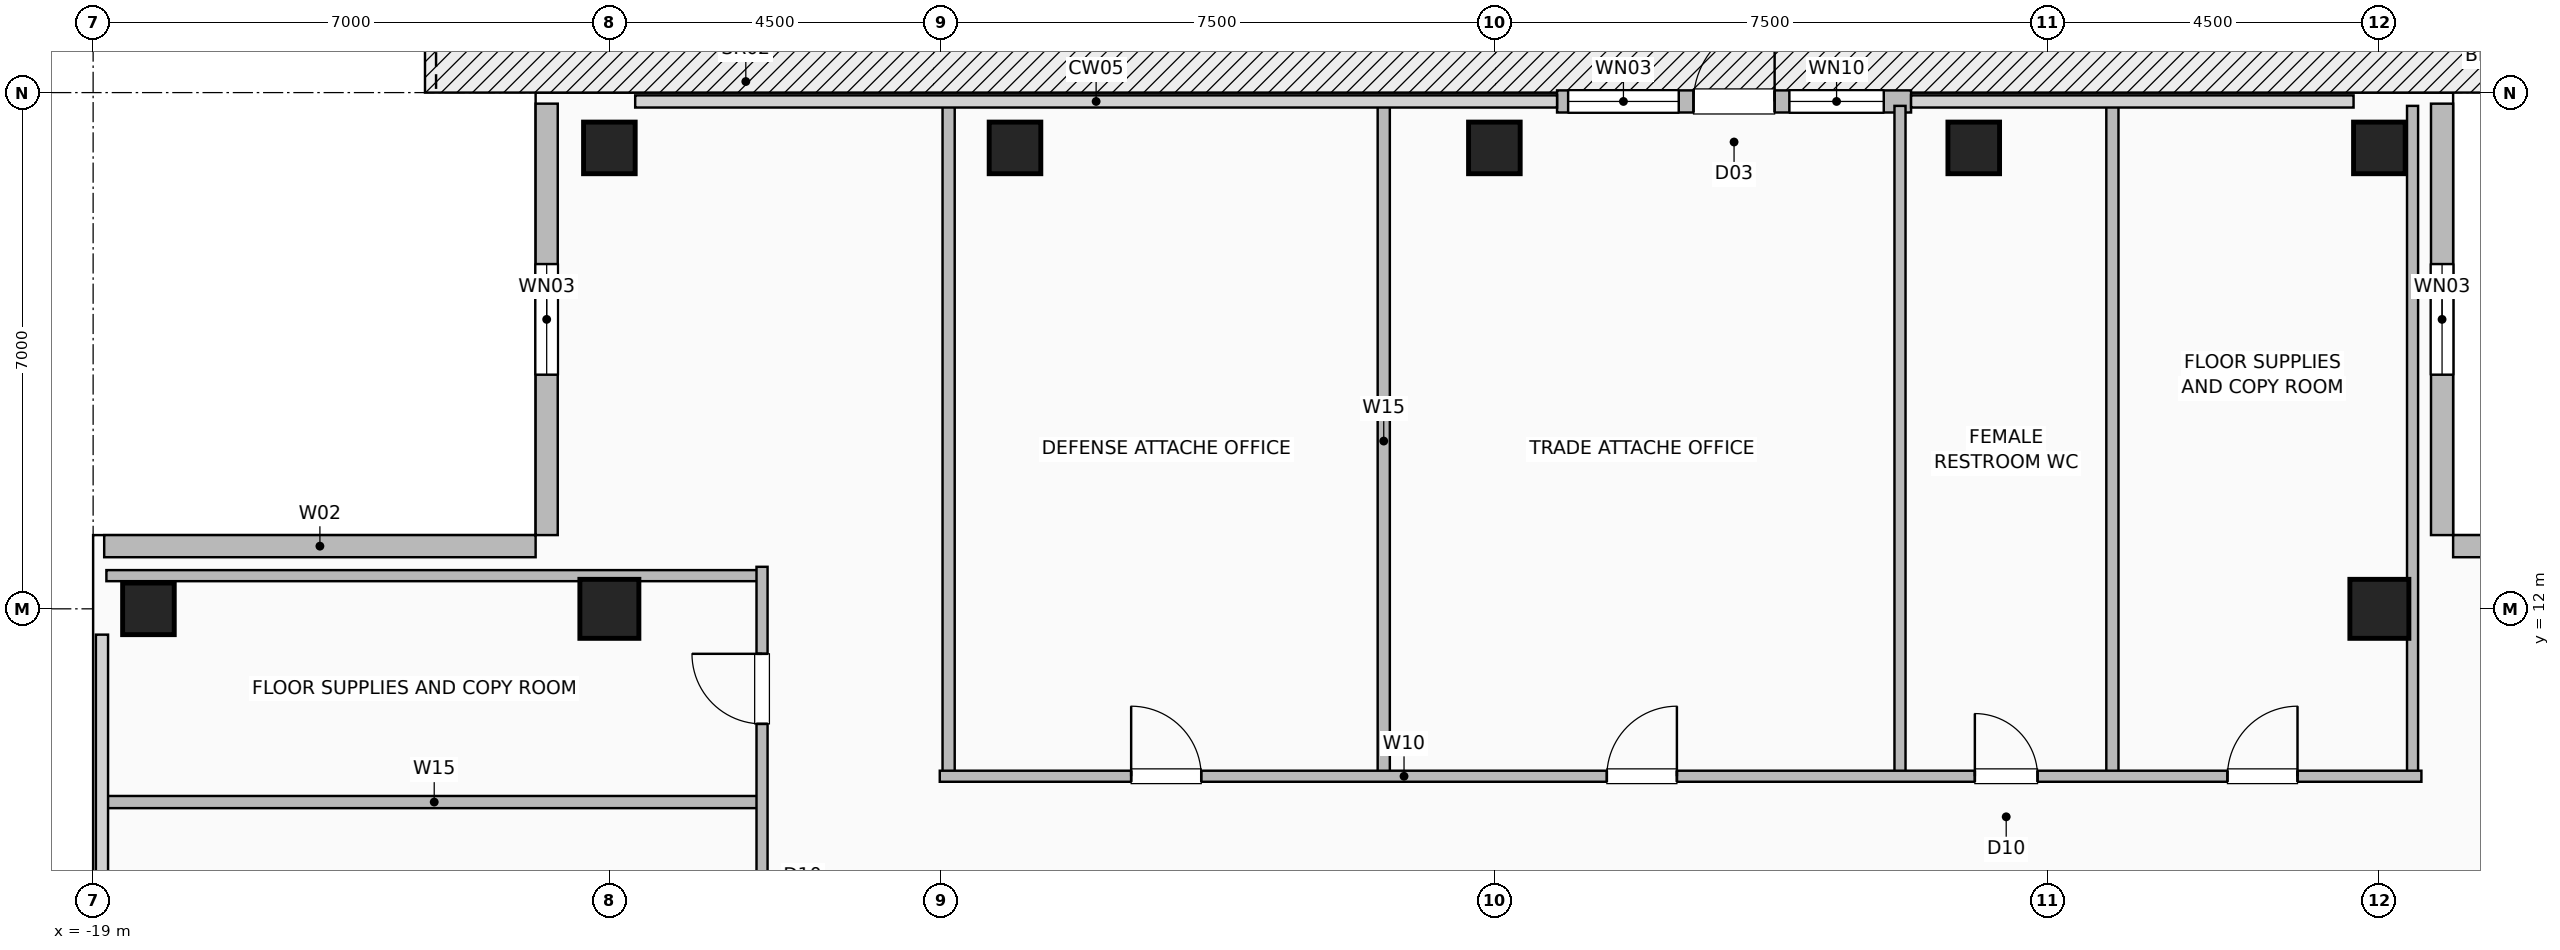
"""IFC4 building model, lengths in metres.
Left out: names, types, materials, properties, quantities, classifications, styles, units other than length and angle.
Written with IfcOpenShell. Run it as: python <this file> out.ifc"""

import sys

from ifc_helpers import new_model, si_unit, direction, frame, frame_2d, origin, origin_2d, place, context, subcontext, project, spatial, rectangle, hollow_rectangle, extrude, element, fill, save


model = new_model("IFC4")
c1 = context("Model", 3, precision=1e-05, world=origin(), true_north=direction((0.0, 1.0)))
c2 = subcontext(c1, "Body", "Model", "MODEL_VIEW")
j1 = project(units=[si_unit("LENGTHUNIT", "METRE"), si_unit("PLANEANGLEUNIT", "RADIAN")], contexts=[c1])
p1 = place(None, origin())
s1 = spatial("IfcSite", under=j1, at=p1, CompositionType="ELEMENT")
p2 = place(p1, origin())
s2 = spatial("IfcBuilding", under=s1, at=p2, CompositionType="ELEMENT")
p3 = place(p2, frame((0.0, 0.0, 232.4)))
s3 = spatial("IfcBuildingStorey", under=s2, at=p3, CompositionType="ELEMENT", Elevation=232.4)
for number, where, z_axis, x_axis in (
    (1, (-12.0, 18.25, -0.4), (0.0, 0.0, 1.0), (1.0, 0.0, 0.0)),
    (2, (-6.5, 18.25, -0.4), (0.0, 0.0, 1.0), (1.0, 0.0, 0.0)),
    (3, (0.0, 18.25, -0.4), (0.0, 0.0, 1.0), (1.0, 0.0, 0.0)),
    (4, (6.5, 18.25, -0.4), (0.0, 0.0, 1.0), (1.0, 0.0, 0.0)),
    (5, (12.0, 18.25, -0.4), (0.0, 0.0, 1.0), (1.0, 0.0, 0.0)),
    (6, (-18.25, 12.0, -0.4), (0.0, 0.0, 1.0), (1.0, 0.0, 0.0)),
):
    element("IfcColumn", number, at=place(p3, frame(where, z_axis=z_axis, x_axis=x_axis)), inside=s3, PredefinedType="COLUMN", context=c2, shape_type="SweptSolid", body=[
        extrude(hollow_rectangle(XDim=0.7, YDim=0.7, WallThickness=0.035, at=origin_2d()), origin(), (0.0, 0.0, 1.0), 4.0),
    ])
for number, where, z_axis, x_axis in (
    (7, (12.0, 12.0, -0.4), (0.0, 0.0, 1.0), (1.0, 0.0, 0.0)),
    (8, (-12.0, 12.0, -0.4), (0.0, 0.0, 1.0), (1.0, 0.0, 0.0)),
):
    element("IfcColumn", number, at=place(p3, frame(where, z_axis=z_axis, x_axis=x_axis)), inside=s3, PredefinedType="COLUMN", context=c2, shape_type="SweptSolid", body=[
        extrude(hollow_rectangle(XDim=0.8, YDim=0.8, WallThickness=0.04, at=origin_2d()), origin(), (0.0, 0.0, 1.0), 4.0),
    ])
p4 = place(p3, frame((0.85, 18.88, 0.0), z_axis=(0.0, 0.0, 1.0), x_axis=(1.0, 0.0, 0.0)))
e9 = element("IfcWall", 9, at=p4, inside=s3, PredefinedType="SOLIDWALL", context=c2, shape_type="SweptSolid", body=[
    extrude(rectangle(XDim=4.8, YDim=0.3, at=frame_2d((2.4, 0.0))), origin(), (0.0, 0.0, 1.0), 3.36),
])
p5 = place(p4, frame((1.85, 0.0, 0.0)))
e10 = element("IfcOpeningElement", 10, at=p5, cuts=e9, PredefinedType="OPENING", context=c2, shape_type="SweptSolid", body=[
    extrude(rectangle(XDim=1.1, YDim=2.2, at=frame_2d((0.55, 1.1))), frame((0.0, 0.16, 0.0), z_axis=(0.0, -1.0, 0.0), x_axis=(1.0, 0.0, 0.0)), (0.0, 0.0, 1.0), 0.32),
])
p6 = place(p4, frame((0.15, 0.0, 0.85)))
e11 = element("IfcOpeningElement", 11, at=p6, cuts=e9, PredefinedType="OPENING", context=c2, shape_type="SweptSolid", body=[
    extrude(rectangle(XDim=1.5, YDim=1.8, at=frame_2d((0.75, 0.9))), frame((0.0, 0.16, 0.0), z_axis=(0.0, -1.0, 0.0), x_axis=(1.0, 0.0, 0.0)), (0.0, 0.0, 1.0), 0.32),
])
p7 = place(p4, frame((3.15, 0.0, 0.85)))
e12 = element("IfcOpeningElement", 12, at=p7, cuts=e9, PredefinedType="OPENING", context=c2, shape_type="SweptSolid", body=[
    extrude(rectangle(XDim=1.28, YDim=1.8, at=frame_2d((0.64, 0.9))), frame((0.0, 0.16, 0.0), z_axis=(0.0, -1.0, 0.0), x_axis=(1.0, 0.0, 0.0)), (0.0, 0.0, 1.0), 0.32),
])
p8 = place(p3, frame((12.85, 18.85, 0.0), z_axis=(0.0, 0.0, 1.0), x_axis=(0.0, -1.0, 0.0)))
e13 = element("IfcWall", 13, at=p8, inside=s3, PredefinedType="SOLIDWALL", context=c2, shape_type="SweptSolid", body=[
    extrude(rectangle(XDim=5.85, YDim=0.3, at=frame_2d((2.925, 0.0))), origin(), (0.0, 0.0, 1.0), 3.36),
])
p9 = place(p8, frame((2.175, 0.0, 0.9)))
e14 = element("IfcOpeningElement", 14, at=p9, cuts=e13, PredefinedType="OPENING", context=c2, shape_type="SweptSolid", body=[
    extrude(rectangle(XDim=1.5, YDim=1.8, at=frame_2d((0.75, 0.9))), frame((0.0, 0.16, 0.0), z_axis=(0.0, -1.0, 0.0), x_axis=(1.0, 0.0, 0.0)), (0.0, 0.0, 1.0), 0.32),
])
p10 = place(p3, frame((18.85, 12.85, 0.0), z_axis=(0.0, 0.0, 1.0), x_axis=(-1.0, 0.0, 0.0)))
e15 = element("IfcWall", 15, at=p10, inside=s3, PredefinedType="SOLIDWALL", context=c2, shape_type="SweptSolid", body=[
    extrude(rectangle(XDim=5.85, YDim=0.3, at=frame_2d((2.925, 0.0))), origin(), (0.0, 0.0, 1.0), 3.36),
])
p11 = place(p3, frame((-12.85, 18.85, 0.0), z_axis=(0.0, 0.0, 1.0), x_axis=(0.0, -1.0, 0.0)))
e16 = element("IfcWall", 16, at=p11, inside=s3, PredefinedType="SOLIDWALL", context=c2, shape_type="SweptSolid", body=[
    extrude(rectangle(XDim=5.85, YDim=0.3, at=frame_2d((2.925, 0.0))), origin(), (0.0, 0.0, 1.0), 3.36),
])
p12 = place(p11, frame((2.175, 0.0, 0.9)))
e17 = element("IfcOpeningElement", 17, at=p12, cuts=e16, PredefinedType="OPENING", context=c2, shape_type="SweptSolid", body=[
    extrude(rectangle(XDim=1.5, YDim=1.8, at=frame_2d((0.75, 0.9))), frame((0.0, 0.16, 0.0), z_axis=(0.0, -1.0, 0.0), x_axis=(1.0, 0.0, 0.0)), (0.0, 0.0, 1.0), 0.32),
])
p13 = place(p3, frame((-18.85, 12.85, 0.0), z_axis=(0.0, 0.0, 1.0), x_axis=(1.0, 0.0, 0.0)))
e18 = element("IfcWall", 18, at=p13, inside=s3, PredefinedType="SOLIDWALL", context=c2, shape_type="SweptSolid", body=[
    extrude(rectangle(XDim=5.85, YDim=0.3, at=frame_2d((2.925, 0.0))), origin(), (0.0, 0.0, 1.0), 3.36),
])
p14 = place(p3, frame((-18.82, 9.38, 0.0), z_axis=(0.0, 0.0, 1.0), x_axis=(1.0, 0.0, 0.0)))
e19 = element("IfcWall", 19, at=p14, inside=s3, PredefinedType="PLUMBINGWALL", context=c2, shape_type="SweptSolid", body=[
    extrude(rectangle(XDim=8.89, YDim=0.165, at=frame_2d((4.445, 0.0))), origin(), (0.0, 0.0, 1.0), 3.36),
])
p15 = place(p3, frame((-18.82, 12.45, 0.0), z_axis=(0.0, 0.0, 1.0), x_axis=(1.0, 0.0, 0.0)))
e20 = element("IfcWall", 20, at=p15, inside=s3, PredefinedType="PARTITIONING", context=c2, shape_type="SweptSolid", body=[
    extrude(rectangle(XDim=8.89, YDim=0.15, at=frame_2d((4.445, 0.0))), origin(), (0.0, 0.0, 1.0), 3.36),
])
p16 = place(p3, frame((-9.93, -7.52, 0.0), z_axis=(0.0, 0.0, 1.0), x_axis=(0.0, 1.0, 0.0)))
e21 = element("IfcWall", 21, at=p16, inside=s3, PredefinedType="PARTITIONING", context=c2, shape_type="SweptSolid", body=[
    extrude(rectangle(XDim=20.09, YDim=0.15, at=frame_2d((10.045, 0.0))), origin(), (0.0, 0.0, 1.0), 3.36),
])
p17 = place(p16, frame((1.945, 0.0, 0.0)))
e22 = element("IfcOpeningElement", 22, at=p17, cuts=e21, PredefinedType="OPENING", context=c2, shape_type="SweptSolid", body=[
    extrude(rectangle(XDim=0.95, YDim=2.06, at=frame_2d((0.475, 1.03))), frame((0.0, 0.085, 0.0), z_axis=(0.0, -1.0, 0.0), x_axis=(1.0, 0.0, 0.0)), (0.0, 0.0, 1.0), 0.17),
])
p18 = place(p16, frame((6.47, 0.0, 0.0)))
e23 = element("IfcOpeningElement", 23, at=p18, cuts=e21, PredefinedType="OPENING", context=c2, shape_type="SweptSolid", body=[
    extrude(rectangle(XDim=0.95, YDim=2.06, at=frame_2d((0.475, 1.03))), frame((0.0, 0.085, 0.0), z_axis=(0.0, -1.0, 0.0), x_axis=(1.0, 0.0, 0.0)), (0.0, 0.0, 1.0), 0.17),
])
p19 = place(p16, frame((11.12, 0.0, 0.0)))
e24 = element("IfcOpeningElement", 24, at=p19, cuts=e21, PredefinedType="OPENING", context=c2, shape_type="SweptSolid", body=[
    extrude(rectangle(XDim=0.95, YDim=2.06, at=frame_2d((0.475, 1.03))), frame((0.0, 0.085, 0.0), z_axis=(0.0, -1.0, 0.0), x_axis=(1.0, 0.0, 0.0)), (0.0, 0.0, 1.0), 0.17),
])
p20 = place(p16, frame((15.035, 0.0, 0.0)))
e25 = element("IfcOpeningElement", 25, at=p20, cuts=e21, PredefinedType="OPENING", context=c2, shape_type="SweptSolid", body=[
    extrude(rectangle(XDim=0.85, YDim=2.05, at=frame_2d((0.425, 1.025))), frame((0.0, 0.085, 0.0), z_axis=(0.0, -1.0, 0.0), x_axis=(1.0, 0.0, 0.0)), (0.0, 0.0, 1.0), 0.17),
])
p21 = place(p16, frame((17.96, 0.0, 0.0)))
e26 = element("IfcOpeningElement", 26, at=p21, cuts=e21, PredefinedType="OPENING", context=c2, shape_type="SweptSolid", body=[
    extrude(rectangle(XDim=0.95, YDim=2.06, at=frame_2d((0.475, 1.03))), frame((0.0, 0.085, 0.0), z_axis=(0.0, -1.0, 0.0), x_axis=(1.0, 0.0, 0.0)), (0.0, 0.0, 1.0), 0.17),
])
for number, where, z_axis, x_axis in (
    (27, (8.38, 9.73, 0.0), (0.0, 0.0, 1.0), (0.0, 1.0, 0.0)),
    (28, (-7.4, 9.73, 0.0), (0.0, 0.0, 1.0), (0.0, 1.0, 0.0)),
    (29, (-1.5, 9.73, 0.0), (0.0, 0.0, 1.0), (0.0, 1.0, 0.0)),
):
    element("IfcWall", number, at=place(p3, frame(where, z_axis=z_axis, x_axis=x_axis)), inside=s3, PredefinedType="PLUMBINGWALL", context=c2, shape_type="SweptSolid", body=[
        extrude(rectangle(XDim=9.09, YDim=0.165, at=frame_2d((4.545, 0.0))), origin(), (0.0, 0.0, 1.0), 3.36),
    ])
for number, where, z_axis, x_axis in (
    (30, (5.5, 9.73, 0.0), (0.0, 0.0, 1.0), (0.0, 1.0, 0.0)),
    (31, (12.45, 9.73, 0.0), (0.0, 0.0, 1.0), (0.0, 1.0, 0.0)),
):
    element("IfcWall", number, at=place(p3, frame(where, z_axis=z_axis, x_axis=x_axis)), inside=s3, PredefinedType="PARTITIONING", context=c2, shape_type="SweptSolid", body=[
        extrude(rectangle(XDim=9.09, YDim=0.15, at=frame_2d((4.545, 0.0))), origin(), (0.0, 0.0, 1.0), 3.36),
    ])
p22 = place(p3, frame((-7.52, 9.73, 0.0), z_axis=(0.0, 0.0, 1.0), x_axis=(1.0, 0.0, 0.0)))
e32 = element("IfcWall", 32, at=p22, inside=s3, PredefinedType="PARTITIONING", context=c2, shape_type="SweptSolid", body=[
    extrude(rectangle(XDim=20.09, YDim=0.15, at=frame_2d((10.045, 0.0))), origin(), (0.0, 0.0, 1.0), 3.36),
])
p23 = place(p22, frame((2.595, 0.0, 0.0)))
e33 = element("IfcOpeningElement", 33, at=p23, cuts=e32, PredefinedType="OPENING", context=c2, shape_type="SweptSolid", body=[
    extrude(rectangle(XDim=0.95, YDim=2.06, at=frame_2d((0.475, 1.03))), frame((0.0, 0.085, 0.0), z_axis=(0.0, -1.0, 0.0), x_axis=(1.0, 0.0, 0.0)), (0.0, 0.0, 1.0), 0.17),
])
p24 = place(p22, frame((9.045, 0.0, 0.0)))
e34 = element("IfcOpeningElement", 34, at=p24, cuts=e32, PredefinedType="OPENING", context=c2, shape_type="SweptSolid", body=[
    extrude(rectangle(XDim=0.95, YDim=2.06, at=frame_2d((0.475, 1.03))), frame((0.0, 0.085, 0.0), z_axis=(0.0, -1.0, 0.0), x_axis=(1.0, 0.0, 0.0)), (0.0, 0.0, 1.0), 0.17),
])
p25 = place(p22, frame((14.035, 0.0, 0.0)))
e35 = element("IfcOpeningElement", 35, at=p25, cuts=e32, PredefinedType="OPENING", context=c2, shape_type="SweptSolid", body=[
    extrude(rectangle(XDim=0.85, YDim=2.05, at=frame_2d((0.425, 1.025))), frame((0.0, 0.085, 0.0), z_axis=(0.0, -1.0, 0.0), x_axis=(1.0, 0.0, 0.0)), (0.0, 0.0, 1.0), 0.17),
])
p26 = place(p22, frame((17.46, 0.0, 0.0)))
e36 = element("IfcOpeningElement", 36, at=p26, cuts=e32, PredefinedType="OPENING", context=c2, shape_type="SweptSolid", body=[
    extrude(rectangle(XDim=0.95, YDim=2.06, at=frame_2d((0.475, 1.03))), frame((0.0, 0.085, 0.0), z_axis=(0.0, -1.0, 0.0), x_axis=(1.0, 0.0, 0.0)), (0.0, 0.0, 1.0), 0.17),
])
p27 = place(p5, origin())
e37 = element("IfcDoor", 37, at=p27, inside=s3, OperationType="SINGLE_SWING_RIGHT", PredefinedType="DOOR", context=c2, shape_type="SweptSolid", body=[
    extrude(rectangle(XDim=1.1, YDim=2.2, at=frame_2d((0.55, 1.1))), frame((0.0, 0.025, 0.0), z_axis=(0.0, -1.0, 0.0), x_axis=(1.0, 0.0, 0.0)), (0.0, 0.0, 1.0), 0.05),
])
fill(e10, e37)
p28 = place(p6, origin())
e38 = element("IfcWindow", 38, at=p28, inside=s3, PartitioningType="SINGLE_PANEL", PredefinedType="WINDOW", context=c2, shape_type="SweptSolid", body=[
    extrude(rectangle(XDim=1.5, YDim=1.8, at=frame_2d((0.75, 0.9))), frame((0.0, 0.03, 0.0), z_axis=(0.0, -1.0, 0.0), x_axis=(1.0, 0.0, 0.0)), (0.0, 0.0, 1.0), 0.06),
])
fill(e11, e38)
p29 = place(p7, origin())
e39 = element("IfcWindow", 39, at=p29, inside=s3, PartitioningType="SINGLE_PANEL", PredefinedType="WINDOW", context=c2, shape_type="SweptSolid", body=[
    extrude(rectangle(XDim=1.28, YDim=1.8, at=frame_2d((0.64, 0.9))), frame((0.0, 0.03, 0.0), z_axis=(0.0, -1.0, 0.0), x_axis=(1.0, 0.0, 0.0)), (0.0, 0.0, 1.0), 0.06),
])
fill(e12, e39)
p30 = place(p9, origin())
e40 = element("IfcWindow", 40, at=p30, inside=s3, PartitioningType="SINGLE_PANEL", PredefinedType="WINDOW", context=c2, shape_type="SweptSolid", body=[
    extrude(rectangle(XDim=1.5, YDim=1.8, at=frame_2d((0.75, 0.9))), frame((0.0, 0.03, 0.0), z_axis=(0.0, -1.0, 0.0), x_axis=(1.0, 0.0, 0.0)), (0.0, 0.0, 1.0), 0.06),
])
fill(e14, e40)
p31 = place(p12, origin())
e41 = element("IfcWindow", 41, at=p31, inside=s3, PartitioningType="SINGLE_PANEL", PredefinedType="WINDOW", context=c2, shape_type="SweptSolid", body=[
    extrude(rectangle(XDim=1.5, YDim=1.8, at=frame_2d((0.75, 0.9))), frame((0.0, 0.03, 0.0), z_axis=(0.0, -1.0, 0.0), x_axis=(1.0, 0.0, 0.0)), (0.0, 0.0, 1.0), 0.06),
])
fill(e17, e41)
p32 = place(p21, origin())
e42 = element("IfcDoor", 42, at=p32, inside=s3, OperationType="SINGLE_SWING_RIGHT", PredefinedType="DOOR", context=c2, shape_type="SweptSolid", body=[
    extrude(rectangle(XDim=0.95, YDim=2.06, at=frame_2d((0.475, 1.03))), frame((0.0, 0.025, 0.0), z_axis=(0.0, -1.0, 0.0), x_axis=(1.0, 0.0, 0.0)), (0.0, 0.0, 1.0), 0.05),
])
fill(e26, e42)
p33 = place(p23, origin())
e43 = element("IfcDoor", 43, at=p33, inside=s3, OperationType="SINGLE_SWING_LEFT", PredefinedType="DOOR", context=c2, shape_type="SweptSolid", body=[
    extrude(rectangle(XDim=0.95, YDim=2.06, at=frame_2d((0.475, 1.03))), frame((0.0, 0.025, 0.0), z_axis=(0.0, -1.0, 0.0), x_axis=(1.0, 0.0, 0.0)), (0.0, 0.0, 1.0), 0.05),
])
fill(e33, e43)
p34 = place(p24, origin())
e44 = element("IfcDoor", 44, at=p34, inside=s3, OperationType="SINGLE_SWING_RIGHT", PredefinedType="DOOR", context=c2, shape_type="SweptSolid", body=[
    extrude(rectangle(XDim=0.95, YDim=2.06, at=frame_2d((0.475, 1.03))), frame((0.0, 0.025, 0.0), z_axis=(0.0, -1.0, 0.0), x_axis=(1.0, 0.0, 0.0)), (0.0, 0.0, 1.0), 0.05),
])
fill(e34, e44)
p35 = place(p25, origin())
e45 = element("IfcDoor", 45, at=p35, inside=s3, OperationType="SINGLE_SWING_LEFT", PredefinedType="DOOR", context=c2, shape_type="SweptSolid", body=[
    extrude(rectangle(XDim=0.85, YDim=2.05, at=frame_2d((0.425, 1.025))), frame((0.0, 0.025, 0.0), z_axis=(0.0, -1.0, 0.0), x_axis=(1.0, 0.0, 0.0)), (0.0, 0.0, 1.0), 0.05),
])
fill(e35, e45)
p36 = place(p26, origin())
e46 = element("IfcDoor", 46, at=p36, inside=s3, OperationType="SINGLE_SWING_RIGHT", PredefinedType="DOOR", context=c2, shape_type="SweptSolid", body=[
    extrude(rectangle(XDim=0.95, YDim=2.06, at=frame_2d((0.475, 1.03))), frame((0.0, 0.025, 0.0), z_axis=(0.0, -1.0, 0.0), x_axis=(1.0, 0.0, 0.0)), (0.0, 0.0, 1.0), 0.05),
])
fill(e36, e46)
save(model, sys.argv[1])
